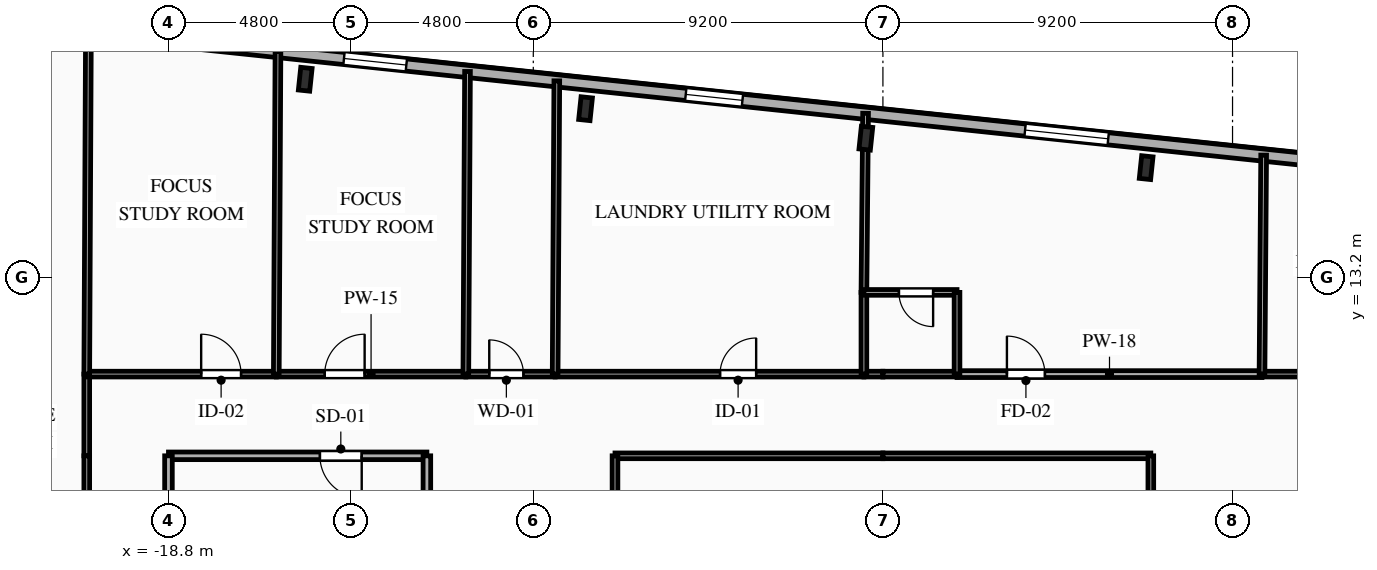
"""IFC4 building model, lengths in metres.
Left out: names, types, materials, properties, quantities, classifications, styles, units other than length and angle.
Written with IfcOpenShell. Run it as: python <this file> out.ifc"""

import sys

from ifc_helpers import new_model, si_unit, direction, frame, frame_2d, origin, origin_2d, place, context, subcontext, project, spatial, rectangle, i_section, extrude, element, fill, save


model = new_model("IFC4")
c1 = context("Model", 3, precision=1e-05, world=origin(), true_north=direction((0.0, 1.0)))
c2 = subcontext(c1, "Body", "Model", "MODEL_VIEW")
j1 = project(units=[si_unit("LENGTHUNIT", "METRE"), si_unit("PLANEANGLEUNIT", "RADIAN")], contexts=[c1])
p1 = place(None, origin())
s1 = spatial("IfcSite", under=j1, at=p1, CompositionType="ELEMENT")
p2 = place(p1, origin())
s2 = spatial("IfcBuilding", under=s1, at=p2, CompositionType="ELEMENT")
p3 = place(p2, frame((0.0, 0.0, 193.05)))
s3 = spatial("IfcBuildingStorey", under=s2, at=p3, CompositionType="ELEMENT", Elevation=193.05)
for number, where, z_axis, x_axis in (
    (1, (6.927, 16.083, 0.0), (0.0, 0.0, 1.0), (0.995, -0.105, 0.0)),
    (2, (-0.449, 16.858, 0.0), (0.0, 0.0, 1.0), (0.995, -0.105, 0.0)),
    (3, (-7.825, 17.634, 0.0), (0.0, 0.0, 1.0), (0.995, -0.105, 0.0)),
    (4, (-15.201, 18.409, 0.0), (0.0, 0.0, 1.0), (0.995, -0.105, 0.0)),
):
    element("IfcColumn", number, at=place(p3, frame(where, z_axis=z_axis, x_axis=x_axis)), inside=s3, PredefinedType="COLUMN", context=c2, shape_type="SweptSolid", body=[
        extrude(i_section(OverallWidth=0.3, OverallDepth=0.6, WebThickness=0.015, FlangeThickness=0.03, FilletRadius=0.027, at=origin_2d()), origin(), (0.0, 0.0, 1.0), 3.35),
    ])
p4 = place(p3, frame((-23.156, 19.898, 0.0), z_axis=(0.0, 0.0, 1.0), x_axis=(0.994522001802, -0.104527450613, 0.0)))
e5 = element("IfcWall", 5, at=p4, inside=s3, PredefinedType="SOLIDWALL", context=c2, shape_type="SweptSolid", body=[
    extrude(rectangle(XDim=45.8, YDim=0.32, at=frame_2d((22.9, 0.0))), origin(), (0.0, 0.0, 1.0), 3.04),
])
p5 = place(p4, frame((4.019, 0.0, 0.85)))
e6 = element("IfcOpeningElement", 6, at=p5, cuts=e5, PredefinedType="OPENING", context=c2, shape_type="SweptSolid", body=[
    extrude(rectangle(XDim=1.65, YDim=1.85, at=frame_2d((0.825, 0.925))), frame((0.0, 0.17, 0.0), z_axis=(0.0, -1.0, 0.0), x_axis=(1.0, 0.0, 0.0)), (0.0, 0.0, 1.0), 0.34),
])
p6 = place(p4, frame((9.024, 0.0, 0.85)))
e7 = element("IfcOpeningElement", 7, at=p6, cuts=e5, PredefinedType="OPENING", context=c2, shape_type="SweptSolid", body=[
    extrude(rectangle(XDim=1.65, YDim=1.85, at=frame_2d((0.825, 0.925))), frame((0.0, 0.17, 0.0), z_axis=(0.0, -1.0, 0.0), x_axis=(1.0, 0.0, 0.0)), (0.0, 0.0, 1.0), 0.34),
])
p7 = place(p4, frame((18.066, 0.0, 0.85)))
e8 = element("IfcOpeningElement", 8, at=p7, cuts=e5, PredefinedType="OPENING", context=c2, shape_type="SweptSolid", body=[
    extrude(rectangle(XDim=1.5, YDim=1.85, at=frame_2d((0.75, 0.925))), frame((0.0, 0.17, 0.0), z_axis=(0.0, -1.0, 0.0), x_axis=(1.0, 0.0, 0.0)), (0.0, 0.0, 1.0), 0.34),
])
p8 = place(p4, frame((27.045, 0.0, 0.85)))
e9 = element("IfcOpeningElement", 9, at=p8, cuts=e5, PredefinedType="OPENING", context=c2, shape_type="SweptSolid", body=[
    extrude(rectangle(XDim=2.2, YDim=1.85, at=frame_2d((1.1, 0.925))), frame((0.0, 0.17, 0.0), z_axis=(0.0, -1.0, 0.0), x_axis=(1.0, 0.0, 0.0)), (0.0, 0.0, 1.0), 0.34),
])
p9 = place(p4, frame((38.089, 0.0, 0.85)))
e10 = element("IfcOpeningElement", 10, at=p9, cuts=e5, PredefinedType="OPENING", context=c2, shape_type="SweptSolid", body=[
    extrude(rectangle(XDim=1.65, YDim=1.85, at=frame_2d((0.825, 0.925))), frame((0.0, 0.17, 0.0), z_axis=(0.0, -1.0, 0.0), x_axis=(1.0, 0.0, 0.0)), (0.0, 0.0, 1.0), 0.34),
])
p10 = place(p3, frame((-12.0, 8.5, 0.0), z_axis=(0.0, 0.0, 1.0), x_axis=(-1.0, 0.0, 0.0)))
e11 = element("IfcWall", 11, at=p10, inside=s3, PredefinedType="PARTITIONING", context=c2, shape_type="SweptSolid", body=[
    extrude(rectangle(XDim=6.8, YDim=0.2, at=frame_2d((3.4, 0.0))), origin(), (0.0, 0.0, 1.0), 3.04),
])
p11 = place(p10, frame((1.715, 0.0, 0.0)))
e12 = element("IfcOpeningElement", 12, at=p11, cuts=e11, PredefinedType="OPENING", context=c2, shape_type="SweptSolid", body=[
    extrude(rectangle(XDim=1.1, YDim=2.15, at=frame_2d((0.55, 1.075))), frame((0.0, 0.11, 0.0), z_axis=(0.0, -1.0, 0.0), x_axis=(1.0, 0.0, 0.0)), (0.0, 0.0, 1.0), 0.22),
])
p12 = place(p3, frame((-18.8, 8.5, 0.0), z_axis=(0.0, 0.0, 1.0), x_axis=(0.0, -1.0, 0.0)))
e13 = element("IfcWall", 13, at=p12, inside=s3, PredefinedType="PARTITIONING", context=c2, shape_type="SweptSolid", body=[
    extrude(rectangle(XDim=2.9, YDim=0.2, at=frame_2d((1.45, 0.0))), origin(), (0.0, 0.0, 1.0), 2.665),
])
p13 = place(p3, frame((-12.0, 5.6, 0.0), z_axis=(0.0, 0.0, 1.0), x_axis=(0.0, 1.0, 0.0)))
e14 = element("IfcWall", 14, at=p13, inside=s3, PredefinedType="PARTITIONING", context=c2, shape_type="SweptSolid", body=[
    extrude(rectangle(XDim=2.9, YDim=0.2, at=frame_2d((1.45, 0.0))), origin(), (0.0, 0.0, 1.0), 3.04),
])
p14 = place(p3, frame((-20.95, 8.5, 0.0), z_axis=(0.0, 0.0, 1.0), x_axis=(0.0, 1.0, 0.0)))
e15 = element("IfcWall", 15, at=p14, inside=s3, PredefinedType="PARTITIONING", context=c2, shape_type="SweptSolid", body=[
    extrude(rectangle(XDim=2.15, YDim=0.15, at=frame_2d((1.075, 0.0))), origin(), (0.0, 0.0, 1.0), 3.04),
])
p15 = place(p3, frame((-20.95, 10.65, 0.0), z_axis=(0.0, 0.0, 1.0), x_axis=(1.0, 0.0, 0.0)))
e16 = element("IfcWall", 16, at=p15, inside=s3, PredefinedType="PARTITIONING", context=c2, shape_type="SweptSolid", body=[
    extrude(rectangle(XDim=4.988, YDim=0.15, at=frame_2d((2.494, 0.0))), origin(), (0.0, 0.0, 1.0), 3.04),
])
p16 = place(p15, frame((3.01, 0.0, 0.0)))
e17 = element("IfcOpeningElement", 17, at=p16, cuts=e16, PredefinedType="OPENING", context=c2, shape_type="SweptSolid", body=[
    extrude(rectangle(XDim=1.05, YDim=2.15, at=frame_2d((0.525, 1.075))), frame((0.0, 0.085, 0.0), z_axis=(0.0, -1.0, 0.0), x_axis=(1.0, 0.0, 0.0)), (0.0, 0.0, 1.0), 0.17),
])
p17 = place(p3, frame((-15.962, 10.65, 0.0), z_axis=(0.0, 0.0, 1.0), x_axis=(1.0, 0.0, 0.0)))
e18 = element("IfcWall", 18, at=p17, inside=s3, PredefinedType="PARTITIONING", context=c2, shape_type="SweptSolid", body=[
    extrude(rectangle(XDim=4.987, YDim=0.15, at=frame_2d((2.494, 0.0))), origin(), (0.0, 0.0, 1.0), 3.04),
])
p18 = place(p17, frame((1.274, 0.0, 0.0)))
e19 = element("IfcOpeningElement", 19, at=p18, cuts=e18, PredefinedType="OPENING", context=c2, shape_type="SweptSolid", body=[
    extrude(rectangle(XDim=1.05, YDim=2.15, at=frame_2d((0.525, 1.075))), frame((0.0, 0.085, 0.0), z_axis=(0.0, -1.0, 0.0), x_axis=(1.0, 0.0, 0.0)), (0.0, 0.0, 1.0), 0.17),
])
p19 = place(p3, frame((-10.975, 10.65, 0.0), z_axis=(0.0, 0.0, 1.0), x_axis=(1.0, 0.0, 0.0)))
e20 = element("IfcWall", 20, at=p19, inside=s3, PredefinedType="PLUMBINGWALL", context=c2, shape_type="SweptSolid", body=[
    extrude(rectangle(XDim=2.35, YDim=0.15, at=frame_2d((1.175, 0.0))), origin(), (0.0, 0.0, 1.0), 3.04),
])
p20 = place(p19, frame((0.616, 0.0, 0.0)))
e21 = element("IfcOpeningElement", 21, at=p20, cuts=e20, PredefinedType="OPENING", context=c2, shape_type="SweptSolid", body=[
    extrude(rectangle(XDim=0.9, YDim=2.1, at=frame_2d((0.45, 1.05))), frame((0.0, 0.085, 0.0), z_axis=(0.0, -1.0, 0.0), x_axis=(1.0, 0.0, 0.0)), (0.0, 0.0, 1.0), 0.17),
])
p21 = place(p3, frame((-8.625, 10.65, 0.0), z_axis=(0.0, 0.0, 1.0), x_axis=(1.0, 0.0, 0.0)))
e22 = element("IfcWall", 22, at=p21, inside=s3, PredefinedType="PARTITIONING", context=c2, shape_type="SweptSolid", body=[
    extrude(rectangle(XDim=8.125, YDim=0.15, at=frame_2d((4.062, 0.0))), origin(), (0.0, 0.0, 1.0), 3.04),
])
p22 = place(p21, frame((4.339, 0.0, 0.0)))
e23 = element("IfcOpeningElement", 23, at=p22, cuts=e22, PredefinedType="OPENING", context=c2, shape_type="SweptSolid", body=[
    extrude(rectangle(XDim=0.95, YDim=2.1, at=frame_2d((0.475, 1.05))), frame((0.0, 0.085, 0.0), z_axis=(0.0, -1.0, 0.0), x_axis=(1.0, 0.0, 0.0)), (0.0, 0.0, 1.0), 0.17),
])
p23 = place(p3, frame((-0.5, 10.65, 0.0), z_axis=(0.0, 0.0, 1.0), x_axis=(1.0, 0.0, 0.0)))
e24 = element("IfcWall", 24, at=p23, inside=s3, PredefinedType="PLUMBINGWALL", context=c2, shape_type="SweptSolid", body=[
    extrude(rectangle(XDim=0.5, YDim=0.15, at=frame_2d((0.25, 0.0))), origin(), (0.0, 0.0, 1.0), 3.04),
])
p24 = place(p3, frame((0.0, 8.5, 0.0), z_axis=(0.0, 0.0, 1.0), x_axis=(-1.0, 0.0, 0.0)))
e25 = element("IfcWall", 25, at=p24, inside=s3, PredefinedType="PARTITIONING", context=c2, shape_type="SweptSolid", body=[
    extrude(rectangle(XDim=7.05, YDim=0.15, at=frame_2d((3.525, 0.0))), origin(), (0.0, 0.0, 1.0), 3.04),
])
p25 = place(p3, frame((1.95, 10.65, 0.0), z_axis=(0.0, 0.0, 1.0), x_axis=(1.0, 0.0, 0.0)))
e26 = element("IfcWall", 26, at=p25, inside=s3, PredefinedType="PARTITIONING", context=c2, shape_type="SweptSolid", body=[
    extrude(rectangle(XDim=8.025, YDim=0.18, at=frame_2d((4.013, 0.0))), origin(), (0.0, 0.0, 1.0), 3.04),
])
p26 = place(p25, frame((1.313, 0.0, 0.0)))
e27 = element("IfcOpeningElement", 27, at=p26, cuts=e26, PredefinedType="OPENING", context=c2, shape_type="SweptSolid", body=[
    extrude(rectangle(XDim=1.0, YDim=2.15, at=frame_2d((0.5, 1.075))), frame((0.0, 0.1, 0.0), z_axis=(0.0, -1.0, 0.0), x_axis=(1.0, 0.0, 0.0)), (0.0, 0.0, 1.0), 0.2),
])
p27 = place(p3, frame((0.0, 10.65, 0.0), z_axis=(0.0, 0.0, 1.0), x_axis=(1.0, 0.0, 0.0)))
e28 = element("IfcWall", 28, at=p27, inside=s3, PredefinedType="PLUMBINGWALL", context=c2, shape_type="SweptSolid", body=[
    extrude(rectangle(XDim=1.95, YDim=0.15, at=frame_2d((0.975, 0.0))), origin(), (0.0, 0.0, 1.0), 3.04),
])
p28 = place(p3, frame((9.975, 10.65, 0.0), z_axis=(0.0, 0.0, 1.0), x_axis=(1.0, 0.0, 0.0)))
e29 = element("IfcWall", 29, at=p28, inside=s3, PredefinedType="PARTITIONING", context=c2, shape_type="SweptSolid", body=[
    extrude(rectangle(XDim=10.975, YDim=0.15, at=frame_2d((5.487, 0.0))), origin(), (0.0, 0.0, 1.0), 3.04),
])
p29 = place(p28, frame((6.058, 0.0, 0.0)))
e30 = element("IfcOpeningElement", 30, at=p29, cuts=e29, PredefinedType="OPENING", context=c2, shape_type="SweptSolid", body=[
    extrude(rectangle(XDim=1.05, YDim=2.15, at=frame_2d((0.525, 1.075))), frame((0.0, 0.085, 0.0), z_axis=(0.0, -1.0, 0.0), x_axis=(1.0, 0.0, 0.0)), (0.0, 0.0, 1.0), 0.17),
])
p30 = place(p3, frame((7.05, 8.5, 0.0), z_axis=(0.0, 0.0, 1.0), x_axis=(-1.0, 0.0, 0.0)))
e31 = element("IfcWall", 31, at=p30, inside=s3, PredefinedType="PARTITIONING", context=c2, shape_type="SweptSolid", body=[
    extrude(rectangle(XDim=7.05, YDim=0.15, at=frame_2d((3.525, 0.0))), origin(), (0.0, 0.0, 1.0), 3.04),
])
p31 = place(p3, frame((-20.95, 2.267, 0.0), z_axis=(0.0, 0.0, 1.0), x_axis=(0.0, 1.0, 0.0)))
e32 = element("IfcWall", 32, at=p31, inside=s3, PredefinedType="PARTITIONING", context=c2, shape_type="SweptSolid", body=[
    extrude(rectangle(XDim=6.233, YDim=0.15, at=frame_2d((3.116, 0.0))), origin(), (0.0, 0.0, 1.0), 3.04),
])
p32 = place(p31, frame((1.083, 0.0, 0.0)))
e33 = element("IfcOpeningElement", 33, at=p32, cuts=e32, PredefinedType="OPENING", context=c2, shape_type="SweptSolid", body=[
    extrude(rectangle(XDim=1.05, YDim=2.15, at=frame_2d((0.525, 1.075))), frame((0.0, 0.085, 0.0), z_axis=(0.0, -1.0, 0.0), x_axis=(1.0, 0.0, 0.0)), (0.0, 0.0, 1.0), 0.17),
])
for number, where, z_axis, x_axis in (
    (34, (-7.05, 8.5, 0.0), (0.0, 0.0, 1.0), (0.0, -1.0, 0.0)),
    (35, (7.05, -0.8, 0.0), (0.0, 0.0, 1.0), (0.0, 1.0, 0.0)),
):
    element("IfcWall", number, at=place(p3, frame(where, z_axis=z_axis, x_axis=x_axis)), inside=s3, PredefinedType="PARTITIONING", context=c2, shape_type="SweptSolid", body=[
        extrude(rectangle(XDim=9.3, YDim=0.15, at=frame_2d((4.65, 0.0))), origin(), (0.0, 0.0, 1.0), 3.04),
    ])
p33 = place(p3, frame((-20.906, 19.662, 0.0), z_axis=(0.0, 0.0, 1.0), x_axis=(-0.004876272857, -0.999988110911, 0.0)))
e36 = element("IfcWall", 36, at=p33, inside=s3, PredefinedType="PARTITIONING", context=c2, shape_type="SweptSolid", body=[
    extrude(rectangle(XDim=9.012, YDim=0.15, at=frame_2d((4.506, 0.0))), origin(), (0.0, 0.0, 1.0), 2.665),
])
p34 = place(p3, frame((-15.919, 19.138, 0.0), z_axis=(0.0, 0.0, 1.0), x_axis=(-0.005148640266, -0.999986745664, 0.0)))
e37 = element("IfcWall", 37, at=p34, inside=s3, PredefinedType="PARTITIONING", context=c2, shape_type="SweptSolid", body=[
    extrude(rectangle(XDim=8.488, YDim=0.15, at=frame_2d((4.244, 0.0))), origin(), (0.0, 0.0, 1.0), 2.665),
])
p35 = place(p3, frame((-10.931, 18.614, 0.0), z_axis=(0.0, 0.0, 1.0), x_axis=(-0.005518172214, -0.999984774772, 0.0)))
e38 = element("IfcWall", 38, at=p35, inside=s3, PredefinedType="PLUMBINGWALL", context=c2, shape_type="SweptSolid", body=[
    extrude(rectangle(XDim=7.964, YDim=0.15, at=frame_2d((3.982, 0.0))), origin(), (0.0, 0.0, 1.0), 3.04),
])
p36 = place(p3, frame((-8.581, 18.366, 0.0), z_axis=(0.0, 0.0, 1.0), x_axis=(-0.005694848646, -0.999983784218, 0.0)))
e39 = element("IfcWall", 39, at=p36, inside=s3, PredefinedType="PLUMBINGWALL", context=c2, shape_type="SweptSolid", body=[
    extrude(rectangle(XDim=7.717, YDim=0.15, at=frame_2d((3.858, 0.0))), origin(), (0.0, 0.0, 1.0), 2.665),
])
p37 = place(p3, frame((-0.456, 17.513, 0.0), z_axis=(0.0, 0.0, 1.0), x_axis=(-0.009324569991, -0.999956525252, 0.0)))
e40 = element("IfcWall", 40, at=p37, inside=s3, PredefinedType="PARTITIONING", context=c2, shape_type="SweptSolid", body=[
    extrude(rectangle(XDim=4.713, YDim=0.15, at=frame_2d((2.356, 0.0))), origin(), (0.0, 0.0, 1.0), 3.04),
])
p38 = place(p3, frame((-0.5, 12.8, 0.0), z_axis=(0.0, 0.0, 1.0), x_axis=(0.0, -1.0, 0.0)))
e41 = element("IfcWall", 41, at=p38, inside=s3, PredefinedType="PLUMBINGWALL", context=c2, shape_type="SweptSolid", body=[
    extrude(rectangle(XDim=2.15, YDim=0.15, at=frame_2d((1.075, 0.0))), origin(), (0.0, 0.0, 1.0), 3.04),
])
p39 = place(p3, frame((1.95, 12.8, 0.0), z_axis=(0.0, 0.0, 1.0), x_axis=(-1.0, 0.0, 0.0)))
e42 = element("IfcWall", 42, at=p39, inside=s3, PredefinedType="PLUMBINGWALL", context=c2, shape_type="SweptSolid", body=[
    extrude(rectangle(XDim=2.45, YDim=0.15, at=frame_2d((1.225, 0.0))), origin(), (0.0, 0.0, 1.0), 3.04),
])
p40 = place(p39, frame((0.629, 0.0, 0.0)))
e43 = element("IfcOpeningElement", 43, at=p40, cuts=e42, PredefinedType="OPENING", context=c2, shape_type="SweptSolid", body=[
    extrude(rectangle(XDim=0.9, YDim=2.1, at=frame_2d((0.45, 1.05))), frame((0.0, 0.085, 0.0), z_axis=(0.0, -1.0, 0.0), x_axis=(1.0, 0.0, 0.0)), (0.0, 0.0, 1.0), 0.17),
])
p41 = place(p3, frame((1.95, 10.65, 0.0), z_axis=(0.0, 0.0, 1.0), x_axis=(0.0, 1.0, 0.0)))
e44 = element("IfcWall", 44, at=p41, inside=s3, PredefinedType="PLUMBINGWALL", context=c2, shape_type="SweptSolid", body=[
    extrude(rectangle(XDim=2.15, YDim=0.15, at=frame_2d((1.075, 0.0))), origin(), (0.0, 0.0, 1.0), 3.04),
])
p42 = place(p3, frame((10.019, 16.412, 0.0), z_axis=(0.0, 0.0, 1.0), x_axis=(-0.007584527603, -0.999971237057, 0.0)))
e45 = element("IfcWall", 45, at=p42, inside=s3, PredefinedType="PARTITIONING", context=c2, shape_type="SweptSolid", body=[
    extrude(rectangle(XDim=5.762, YDim=0.15, at=frame_2d((2.881, 0.0))), origin(), (0.0, 0.0, 1.0), 3.04),
])
p43 = place(p6, origin())
e46 = element("IfcWindow", 46, at=p43, inside=s3, PartitioningType="SINGLE_PANEL", PredefinedType="WINDOW", context=c2, shape_type="SweptSolid", body=[
    extrude(rectangle(XDim=1.65, YDim=1.85, at=frame_2d((0.825, 0.925))), frame((0.0, 0.03, 0.0), z_axis=(0.0, -1.0, 0.0), x_axis=(1.0, 0.0, 0.0)), (0.0, 0.0, 1.0), 0.06),
])
fill(e7, e46)
p44 = place(p7, origin())
e47 = element("IfcWindow", 47, at=p44, inside=s3, PartitioningType="SINGLE_PANEL", PredefinedType="WINDOW", context=c2, shape_type="SweptSolid", body=[
    extrude(rectangle(XDim=1.5, YDim=1.85, at=frame_2d((0.75, 0.925))), frame((0.0, 0.03, 0.0), z_axis=(0.0, -1.0, 0.0), x_axis=(1.0, 0.0, 0.0)), (0.0, 0.0, 1.0), 0.06),
])
fill(e8, e47)
p45 = place(p8, origin())
e48 = element("IfcWindow", 48, at=p45, inside=s3, PartitioningType="SINGLE_PANEL", PredefinedType="WINDOW", context=c2, shape_type="SweptSolid", body=[
    extrude(rectangle(XDim=2.2, YDim=1.85, at=frame_2d((1.1, 0.925))), frame((0.0, 0.03, 0.0), z_axis=(0.0, -1.0, 0.0), x_axis=(1.0, 0.0, 0.0)), (0.0, 0.0, 1.0), 0.06),
])
fill(e9, e48)
p46 = place(p11, origin())
e49 = element("IfcDoor", 49, at=p46, inside=s3, OperationType="SINGLE_SWING_LEFT", PredefinedType="DOOR", context=c2, shape_type="SweptSolid", body=[
    extrude(rectangle(XDim=1.1, YDim=2.15, at=frame_2d((0.55, 1.075))), frame((0.0, 0.025, 0.0), z_axis=(0.0, -1.0, 0.0), x_axis=(1.0, 0.0, 0.0)), (0.0, 0.0, 1.0), 0.05),
])
fill(e12, e49)
p47 = place(p16, origin())
e50 = element("IfcDoor", 50, at=p47, inside=s3, OperationType="SINGLE_SWING_LEFT", PredefinedType="DOOR", context=c2, shape_type="SweptSolid", body=[
    extrude(rectangle(XDim=1.05, YDim=2.15, at=frame_2d((0.525, 1.075))), frame((0.0, 0.025, 0.0), z_axis=(0.0, -1.0, 0.0), x_axis=(1.0, 0.0, 0.0)), (0.0, 0.0, 1.0), 0.05),
])
fill(e17, e50)
p48 = place(p18, origin())
e51 = element("IfcDoor", 51, at=p48, inside=s3, OperationType="SINGLE_SWING_RIGHT", PredefinedType="DOOR", context=c2, shape_type="SweptSolid", body=[
    extrude(rectangle(XDim=1.05, YDim=2.15, at=frame_2d((0.525, 1.075))), frame((0.0, 0.025, 0.0), z_axis=(0.0, -1.0, 0.0), x_axis=(1.0, 0.0, 0.0)), (0.0, 0.0, 1.0), 0.05),
])
fill(e19, e51)
p49 = place(p20, origin())
e52 = element("IfcDoor", 52, at=p49, inside=s3, OperationType="SINGLE_SWING_LEFT", PredefinedType="DOOR", context=c2, shape_type="SweptSolid", body=[
    extrude(rectangle(XDim=0.9, YDim=2.1, at=frame_2d((0.45, 1.05))), frame((0.0, 0.025, 0.0), z_axis=(0.0, -1.0, 0.0), x_axis=(1.0, 0.0, 0.0)), (0.0, 0.0, 1.0), 0.05),
])
fill(e21, e52)
p50 = place(p22, origin())
e53 = element("IfcDoor", 53, at=p50, inside=s3, OperationType="SINGLE_SWING_RIGHT", PredefinedType="DOOR", context=c2, shape_type="SweptSolid", body=[
    extrude(rectangle(XDim=0.95, YDim=2.1, at=frame_2d((0.475, 1.05))), frame((0.0, 0.025, 0.0), z_axis=(0.0, -1.0, 0.0), x_axis=(1.0, 0.0, 0.0)), (0.0, 0.0, 1.0), 0.05),
])
fill(e23, e53)
p51 = place(p26, origin())
e54 = element("IfcDoor", 54, at=p51, inside=s3, OperationType="SINGLE_SWING_LEFT", PredefinedType="DOOR", context=c2, shape_type="SweptSolid", body=[
    extrude(rectangle(XDim=1.0, YDim=2.15, at=frame_2d((0.5, 1.075))), frame((0.0, 0.025, 0.0), z_axis=(0.0, -1.0, 0.0), x_axis=(1.0, 0.0, 0.0)), (0.0, 0.0, 1.0), 0.05),
])
fill(e27, e54)
p52 = place(p40, origin())
e55 = element("IfcDoor", 55, at=p52, inside=s3, OperationType="SINGLE_SWING_LEFT", PredefinedType="DOOR", context=c2, shape_type="SweptSolid", body=[
    extrude(rectangle(XDim=0.9, YDim=2.1, at=frame_2d((0.45, 1.05))), frame((0.0, 0.025, 0.0), z_axis=(0.0, -1.0, 0.0), x_axis=(1.0, 0.0, 0.0)), (0.0, 0.0, 1.0), 0.05),
])
fill(e43, e55)
save(model, sys.argv[1])
